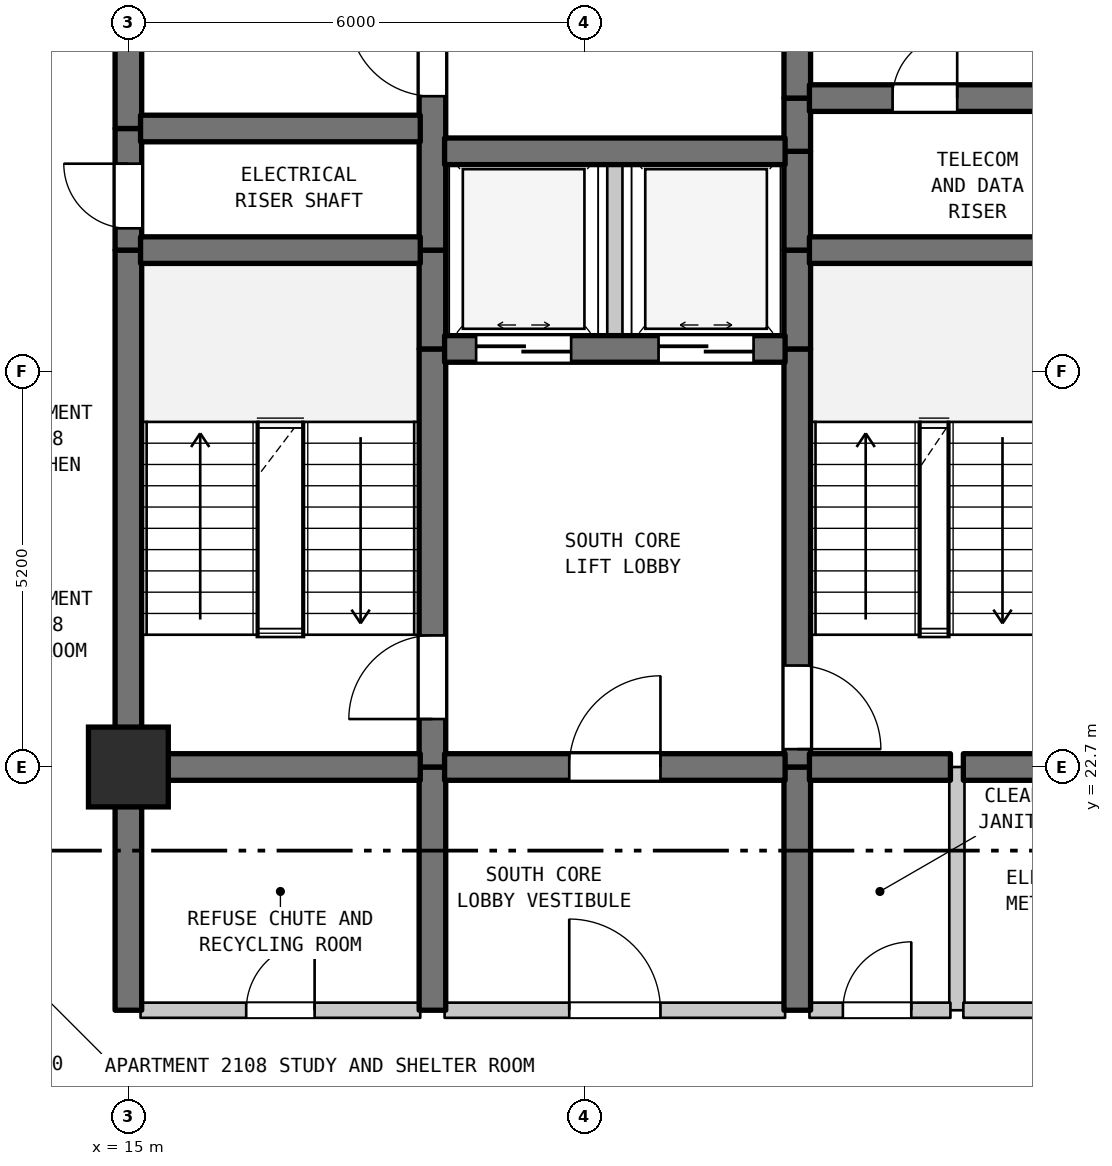
"""IFC4 building model, lengths in metres.
Left out: names, types, materials, properties, quantities, classifications, styles, units other than length and angle.
Written with IfcOpenShell. Run it as: python <this file> out.ifc"""

import sys

from ifc_helpers import new_model, si_unit, direction, frame, frame_2d, origin, origin_2d, place, context, subcontext, project, spatial, rectangle, extrude, element, fill, save


model = new_model("IFC4")
c1 = context("Model", 3, precision=1e-05, world=origin(), true_north=direction((0.0, 1.0)))
c2 = subcontext(c1, "Body", "Model", "MODEL_VIEW")
j1 = project(units=[si_unit("LENGTHUNIT", "METRE"), si_unit("PLANEANGLEUNIT", "RADIAN")], contexts=[c1])
p1 = place(None, origin())
s1 = spatial("IfcSite", under=j1, at=p1, CompositionType="ELEMENT")
p2 = place(p1, origin())
s2 = spatial("IfcBuilding", under=s1, at=p2, CompositionType="ELEMENT")
p3 = place(p2, frame((0.0, 0.0, 90.9)))
s3 = spatial("IfcBuildingStorey", under=s2, at=p3, CompositionType="ELEMENT", Elevation=90.9)
p4 = place(p3, frame((15.0, 22.7, 0.0), z_axis=(0.0, 0.0, 1.0), x_axis=(1.0, 0.0, 0.0)))
e1 = element("IfcColumn", 1, at=p4, inside=s3, PredefinedType="COLUMN", context=c2, shape_type="SweptSolid", body=[
    extrude(rectangle(XDim=1.05, YDim=1.05, at=origin_2d()), origin(), (0.0, 0.0, 1.0), 3.7),
])
p5 = place(p3, frame((15.0, 19.5, 0.0), z_axis=(0.0, 0.0, 1.0), x_axis=(0.0, 1.0, 0.0)))
e2 = element("IfcWall", 2, at=p5, inside=s3, PredefinedType="SHEAR", context=c2, shape_type="SweptSolid", body=[
    extrude(rectangle(XDim=3.2, YDim=0.35, at=frame_2d((1.6, 0.0))), origin(), (0.0, 0.0, 1.0), 3.385),
])
p6 = place(p3, frame((15.0, 22.7, 0.0), z_axis=(0.0, 0.0, 1.0), x_axis=(0.0, 1.0, 0.0)))
e3 = element("IfcWall", 3, at=p6, inside=s3, PredefinedType="SHEAR", context=c2, shape_type="SweptSolid", body=[
    extrude(rectangle(XDim=6.8, YDim=0.35, at=frame_2d((3.4, 0.0))), origin(), (0.0, 0.0, 1.0), 3.385),
])
p7 = place(p3, frame((15.0, 29.5, 0.0), z_axis=(0.0, 0.0, 1.0), x_axis=(0.0, 1.0, 0.0)))
e4 = element("IfcWall", 4, at=p7, inside=s3, PredefinedType="SHEAR", context=c2, shape_type="SweptSolid", body=[
    extrude(rectangle(XDim=1.6, YDim=0.35, at=frame_2d((0.8, 0.0))), origin(), (0.0, 0.0, 1.0), 3.385),
])
p8 = place(p7, frame((0.287, 0.0, 0.0)))
e5 = element("IfcOpeningElement", 5, at=p8, cuts=e4, PredefinedType="OPENING", context=c2, shape_type="SweptSolid", body=[
    extrude(rectangle(XDim=0.85, YDim=2.1, at=frame_2d((0.425, 1.05))), frame((0.0, 0.185, 0.0), z_axis=(0.0, -1.0, 0.0), x_axis=(1.0, 0.0, 0.0)), (0.0, 0.0, 1.0), 0.37),
])
p9 = place(p3, frame((15.0, 31.1, 0.0), z_axis=(0.0, 0.0, 1.0), x_axis=(0.0, 1.0, 0.0)))
e6 = element("IfcWall", 6, at=p9, inside=s3, PredefinedType="SHEAR", context=c2, shape_type="SweptSolid", body=[
    extrude(rectangle(XDim=6.8, YDim=0.35, at=frame_2d((3.4, 0.0))), origin(), (0.0, 0.0, 1.0), 3.385),
])
p10 = place(p3, frame((19.0, 19.5, 0.0), z_axis=(0.0, 0.0, 1.0), x_axis=(0.0, 1.0, 0.0)))
e7 = element("IfcWall", 7, at=p10, inside=s3, PredefinedType="SHEAR", context=c2, shape_type="SweptSolid", body=[
    extrude(rectangle(XDim=3.2, YDim=0.35, at=frame_2d((1.6, 0.0))), origin(), (0.0, 0.0, 1.0), 3.385),
])
p11 = place(p3, frame((19.0, 22.7, 0.0), z_axis=(0.0, 0.0, 1.0), x_axis=(0.0, 1.0, 0.0)))
e8 = element("IfcWall", 8, at=p11, inside=s3, PredefinedType="SHEAR", context=c2, shape_type="SweptSolid", body=[
    extrude(rectangle(XDim=5.5, YDim=0.35, at=frame_2d((2.75, 0.0))), origin(), (0.0, 0.0, 1.0), 3.385),
])
p12 = place(p11, frame((0.631, 0.0, 0.0)))
e9 = element("IfcOpeningElement", 9, at=p12, cuts=e8, PredefinedType="OPENING", context=c2, shape_type="SweptSolid", body=[
    extrude(rectangle(XDim=1.1, YDim=2.15, at=frame_2d((0.55, 1.075))), frame((0.0, 0.185, 0.0), z_axis=(0.0, -1.0, 0.0), x_axis=(1.0, 0.0, 0.0)), (0.0, 0.0, 1.0), 0.37),
])
p13 = place(p3, frame((19.0, 28.2, 0.0), z_axis=(0.0, 0.0, 1.0), x_axis=(0.0, 1.0, 0.0)))
e10 = element("IfcWall", 10, at=p13, inside=s3, PredefinedType="SHEAR", context=c2, shape_type="SweptSolid", body=[
    extrude(rectangle(XDim=1.3, YDim=0.35, at=frame_2d((0.65, 0.0))), origin(), (0.0, 0.0, 1.0), 3.385),
])
p14 = place(p3, frame((19.0, 29.5, 0.0), z_axis=(0.0, 0.0, 1.0), x_axis=(0.0, 1.0, 0.0)))
e11 = element("IfcWall", 11, at=p14, inside=s3, PredefinedType="SHEAR", context=c2, shape_type="SweptSolid", body=[
    extrude(rectangle(XDim=5.5, YDim=0.35, at=frame_2d((2.75, 0.0))), origin(), (0.0, 0.0, 1.0), 3.385),
])
p15 = place(p14, frame((2.025, 0.0, 0.0)))
e12 = element("IfcOpeningElement", 12, at=p15, cuts=e11, PredefinedType="OPENING", context=c2, shape_type="SweptSolid", body=[
    extrude(rectangle(XDim=1.1, YDim=2.15, at=frame_2d((0.55, 1.075))), frame((0.0, 0.185, 0.0), z_axis=(0.0, -1.0, 0.0), x_axis=(1.0, 0.0, 0.0)), (0.0, 0.0, 1.0), 0.37),
])
p16 = place(p3, frame((21.4, 28.2, 0.0), z_axis=(0.0, 0.0, 1.0), x_axis=(0.0, 1.0, 0.0)))
e13 = element("IfcWall", 13, at=p16, inside=s3, PredefinedType="STANDARD", context=c2, shape_type="SweptSolid", body=[
    extrude(rectangle(XDim=2.6, YDim=0.2, at=frame_2d((1.3, 0.0))), origin(), (0.0, 0.0, 1.0), 3.385),
])
p17 = place(p3, frame((23.8, 19.5, 0.0), z_axis=(0.0, 0.0, 1.0), x_axis=(0.0, 1.0, 0.0)))
e14 = element("IfcWall", 14, at=p17, inside=s3, PredefinedType="SHEAR", context=c2, shape_type="SweptSolid", body=[
    extrude(rectangle(XDim=3.2, YDim=0.35, at=frame_2d((1.6, 0.0))), origin(), (0.0, 0.0, 1.0), 3.385),
])
p18 = place(p3, frame((23.8, 22.7, 0.0), z_axis=(0.0, 0.0, 1.0), x_axis=(0.0, 1.0, 0.0)))
e15 = element("IfcWall", 15, at=p18, inside=s3, PredefinedType="SHEAR", context=c2, shape_type="SweptSolid", body=[
    extrude(rectangle(XDim=5.5, YDim=0.35, at=frame_2d((2.75, 0.0))), origin(), (0.0, 0.0, 1.0), 3.385),
])
p19 = place(p18, frame((0.235, 0.0, 0.0)))
e16 = element("IfcOpeningElement", 16, at=p19, cuts=e15, PredefinedType="OPENING", context=c2, shape_type="SweptSolid", body=[
    extrude(rectangle(XDim=1.1, YDim=2.15, at=frame_2d((0.55, 1.075))), frame((0.0, 0.185, 0.0), z_axis=(0.0, -1.0, 0.0), x_axis=(1.0, 0.0, 0.0)), (0.0, 0.0, 1.0), 0.37),
])
for number, where, z_axis, x_axis in (
    (17, (23.8, 28.2, 0.0), (0.0, 0.0, 1.0), (0.0, 1.0, 0.0)),
    (18, (23.8, 29.5, 0.0), (0.0, 0.0, 1.0), (0.0, 1.0, 0.0)),
):
    element("IfcWall", number, at=place(p3, frame(where, z_axis=z_axis, x_axis=x_axis)), inside=s3, PredefinedType="SHEAR", context=c2, shape_type="SweptSolid", body=[
        extrude(rectangle(XDim=1.3, YDim=0.35, at=frame_2d((0.65, 0.0))), origin(), (0.0, 0.0, 1.0), 3.385),
    ])
p20 = place(p3, frame((23.8, 30.8, 0.0), z_axis=(0.0, 0.0, 1.0), x_axis=(0.0, 1.0, 0.0)))
e19 = element("IfcWall", 19, at=p20, inside=s3, PredefinedType="SHEAR", context=c2, shape_type="SweptSolid", body=[
    extrude(rectangle(XDim=0.7, YDim=0.35, at=frame_2d((0.35, 0.0))), origin(), (0.0, 0.0, 1.0), 3.385),
])
p21 = place(p3, frame((23.8, 31.5, 0.0), z_axis=(0.0, 0.0, 1.0), x_axis=(0.0, 1.0, 0.0)))
e20 = element("IfcWall", 20, at=p21, inside=s3, PredefinedType="SHEAR", context=c2, shape_type="SweptSolid", body=[
    extrude(rectangle(XDim=3.5, YDim=0.35, at=frame_2d((1.75, 0.0))), origin(), (0.0, 0.0, 1.0), 3.385),
])
p22 = place(p21, frame((1.127, 0.0, 0.0)))
e21 = element("IfcOpeningElement", 21, at=p22, cuts=e20, PredefinedType="OPENING", context=c2, shape_type="SweptSolid", body=[
    extrude(rectangle(XDim=1.1, YDim=2.15, at=frame_2d((0.55, 1.075))), frame((0.0, 0.185, 0.0), z_axis=(0.0, -1.0, 0.0), x_axis=(1.0, 0.0, 0.0)), (0.0, 0.0, 1.0), 0.37),
])
p23 = place(p3, frame((25.9, 19.5, 0.0), z_axis=(0.0, 0.0, 1.0), x_axis=(0.0, 1.0, 0.0)))
e22 = element("IfcWall", 22, at=p23, inside=s3, PredefinedType="STANDARD", context=c2, shape_type="SweptSolid", body=[
    extrude(rectangle(XDim=3.2, YDim=0.2, at=frame_2d((1.6, 0.0))), origin(), (0.0, 0.0, 1.0), 3.385),
])
p24 = place(p3, frame((15.16, 19.5, 0.0), z_axis=(0.0, 0.0, 1.0), x_axis=(1.0, 0.0, 0.0)))
e23 = element("IfcWall", 23, at=p24, inside=s3, PredefinedType="STANDARD", context=c2, shape_type="SweptSolid", body=[
    extrude(rectangle(XDim=3.68, YDim=0.2, at=frame_2d((1.84, 0.0))), origin(), (0.0, 0.0, 1.0), 3.385),
])
p25 = place(p24, frame((1.39, 0.0, 0.0)))
e24 = element("IfcOpeningElement", 24, at=p25, cuts=e23, PredefinedType="OPENING", context=c2, shape_type="SweptSolid", body=[
    extrude(rectangle(XDim=0.9, YDim=2.15, at=frame_2d((0.45, 1.075))), frame((0.0, 0.11, 0.0), z_axis=(0.0, -1.0, 0.0), x_axis=(1.0, 0.0, 0.0)), (0.0, 0.0, 1.0), 0.22),
])
p26 = place(p3, frame((19.16, 19.5, 0.0), z_axis=(0.0, 0.0, 1.0), x_axis=(1.0, 0.0, 0.0)))
e25 = element("IfcWall", 25, at=p26, inside=s3, PredefinedType="STANDARD", context=c2, shape_type="SweptSolid", body=[
    extrude(rectangle(XDim=4.48, YDim=0.2, at=frame_2d((2.24, 0.0))), origin(), (0.0, 0.0, 1.0), 3.385),
])
p27 = place(p26, frame((1.64, 0.0, 0.0)))
e26 = element("IfcOpeningElement", 26, at=p27, cuts=e25, PredefinedType="OPENING", context=c2, shape_type="SweptSolid", body=[
    extrude(rectangle(XDim=1.2, YDim=2.2, at=frame_2d((0.6, 1.1))), frame((0.0, 0.11, 0.0), z_axis=(0.0, -1.0, 0.0), x_axis=(1.0, 0.0, 0.0)), (0.0, 0.0, 1.0), 0.22),
])
p28 = place(p3, frame((23.96, 19.5, 0.0), z_axis=(0.0, 0.0, 1.0), x_axis=(1.0, 0.0, 0.0)))
e27 = element("IfcWall", 27, at=p28, inside=s3, PredefinedType="STANDARD", context=c2, shape_type="SweptSolid", body=[
    extrude(rectangle(XDim=1.855, YDim=0.2, at=frame_2d((0.927, 0.0))), origin(), (0.0, 0.0, 1.0), 3.385),
])
p29 = place(p28, frame((0.44, 0.0, 0.0)))
e28 = element("IfcOpeningElement", 28, at=p29, cuts=e27, PredefinedType="OPENING", context=c2, shape_type="SweptSolid", body=[
    extrude(rectangle(XDim=0.9, YDim=2.15, at=frame_2d((0.45, 1.075))), frame((0.0, 0.11, 0.0), z_axis=(0.0, -1.0, 0.0), x_axis=(1.0, 0.0, 0.0)), (0.0, 0.0, 1.0), 0.22),
])
p30 = place(p3, frame((25.985, 19.5, 0.0), z_axis=(0.0, 0.0, 1.0), x_axis=(1.0, 0.0, 0.0)))
e29 = element("IfcWall", 29, at=p30, inside=s3, PredefinedType="STANDARD", context=c2, shape_type="SweptSolid", body=[
    extrude(rectangle(XDim=4.655, YDim=0.2, at=frame_2d((2.327, 0.0))), origin(), (0.0, 0.0, 1.0), 3.385),
])
p31 = place(p30, frame((1.845, 0.0, 0.0)))
e30 = element("IfcOpeningElement", 30, at=p31, cuts=e29, PredefinedType="OPENING", context=c2, shape_type="SweptSolid", body=[
    extrude(rectangle(XDim=0.9, YDim=2.15, at=frame_2d((0.45, 1.075))), frame((0.0, 0.11, 0.0), z_axis=(0.0, -1.0, 0.0), x_axis=(1.0, 0.0, 0.0)), (0.0, 0.0, 1.0), 0.22),
])
p32 = place(p3, frame((15.16, 22.7, 0.0), z_axis=(0.0, 0.0, 1.0), x_axis=(1.0, 0.0, 0.0)))
e31 = element("IfcWall", 31, at=p32, inside=s3, PredefinedType="SHEAR", context=c2, shape_type="SweptSolid", body=[
    extrude(rectangle(XDim=3.68, YDim=0.35, at=frame_2d((1.84, 0.0))), origin(), (0.0, 0.0, 1.0), 3.385),
])
p33 = place(p3, frame((19.16, 22.7, 0.0), z_axis=(0.0, 0.0, 1.0), x_axis=(1.0, 0.0, 0.0)))
e32 = element("IfcWall", 32, at=p33, inside=s3, PredefinedType="SHEAR", context=c2, shape_type="SweptSolid", body=[
    extrude(rectangle(XDim=4.48, YDim=0.35, at=frame_2d((2.24, 0.0))), origin(), (0.0, 0.0, 1.0), 3.385),
])
p34 = place(p33, frame((1.64, 0.0, 0.0)))
e33 = element("IfcOpeningElement", 33, at=p34, cuts=e32, PredefinedType="OPENING", context=c2, shape_type="SweptSolid", body=[
    extrude(rectangle(XDim=1.2, YDim=2.2, at=frame_2d((0.6, 1.1))), frame((0.0, 0.185, 0.0), z_axis=(0.0, -1.0, 0.0), x_axis=(1.0, 0.0, 0.0)), (0.0, 0.0, 1.0), 0.37),
])
p35 = place(p3, frame((23.96, 22.7, 0.0), z_axis=(0.0, 0.0, 1.0), x_axis=(1.0, 0.0, 0.0)))
e34 = element("IfcWall", 34, at=p35, inside=s3, PredefinedType="SHEAR", context=c2, shape_type="SweptSolid", body=[
    extrude(rectangle(XDim=1.855, YDim=0.35, at=frame_2d((0.927, 0.0))), origin(), (0.0, 0.0, 1.0), 3.385),
])
p36 = place(p3, frame((25.985, 22.7, 0.0), z_axis=(0.0, 0.0, 1.0), x_axis=(1.0, 0.0, 0.0)))
e35 = element("IfcWall", 35, at=p36, inside=s3, PredefinedType="SHEAR", context=c2, shape_type="SweptSolid", body=[
    extrude(rectangle(XDim=1.155, YDim=0.35, at=frame_2d((0.577, 0.0))), origin(), (0.0, 0.0, 1.0), 3.385),
])
p37 = place(p3, frame((19.16, 28.2, 0.0), z_axis=(0.0, 0.0, 1.0), x_axis=(1.0, 0.0, 0.0)))
e36 = element("IfcWall", 36, at=p37, inside=s3, PredefinedType="SHEAR", context=c2, shape_type="SweptSolid", body=[
    extrude(rectangle(XDim=4.48, YDim=0.35, at=frame_2d((2.24, 0.0))), origin(), (0.0, 0.0, 1.0), 3.385),
])
p38 = place(p37, frame((0.415, 0.0, 0.0)))
e37 = element("IfcOpeningElement", 37, at=p38, cuts=e36, PredefinedType="OPENING", context=c2, shape_type="SweptSolid", body=[
    extrude(rectangle(XDim=1.25, YDim=2.2, at=frame_2d((0.625, 1.1))), frame((0.0, 0.185, 0.0), z_axis=(0.0, -1.0, 0.0), x_axis=(1.0, 0.0, 0.0)), (0.0, 0.0, 1.0), 0.37),
])
p39 = place(p37, frame((2.815, 0.0, 0.0)))
e38 = element("IfcOpeningElement", 38, at=p39, cuts=e36, PredefinedType="OPENING", context=c2, shape_type="SweptSolid", body=[
    extrude(rectangle(XDim=1.25, YDim=2.2, at=frame_2d((0.625, 1.1))), frame((0.0, 0.185, 0.0), z_axis=(0.0, -1.0, 0.0), x_axis=(1.0, 0.0, 0.0)), (0.0, 0.0, 1.0), 0.37),
])
p40 = place(p3, frame((15.16, 29.5, 0.0), z_axis=(0.0, 0.0, 1.0), x_axis=(1.0, 0.0, 0.0)))
e39 = element("IfcWall", 39, at=p40, inside=s3, PredefinedType="SHEAR", context=c2, shape_type="SweptSolid", body=[
    extrude(rectangle(XDim=3.68, YDim=0.35, at=frame_2d((1.84, 0.0))), origin(), (0.0, 0.0, 1.0), 3.385),
])
p41 = place(p3, frame((23.96, 29.5, 0.0), z_axis=(0.0, 0.0, 1.0), x_axis=(1.0, 0.0, 0.0)))
e40 = element("IfcWall", 40, at=p41, inside=s3, PredefinedType="SHEAR", context=c2, shape_type="SweptSolid", body=[
    extrude(rectangle(XDim=3.18, YDim=0.35, at=frame_2d((1.59, 0.0))), origin(), (0.0, 0.0, 1.0), 3.385),
])
p42 = place(p3, frame((19.16, 30.8, 0.0), z_axis=(0.0, 0.0, 1.0), x_axis=(1.0, 0.0, 0.0)))
e41 = element("IfcWall", 41, at=p42, inside=s3, PredefinedType="SHEAR", context=c2, shape_type="SweptSolid", body=[
    extrude(rectangle(XDim=4.48, YDim=0.35, at=frame_2d((2.24, 0.0))), origin(), (0.0, 0.0, 1.0), 3.385),
])
p43 = place(p3, frame((15.16, 31.1, 0.0), z_axis=(0.0, 0.0, 1.0), x_axis=(1.0, 0.0, 0.0)))
e42 = element("IfcWall", 42, at=p43, inside=s3, PredefinedType="SHEAR", context=c2, shape_type="SweptSolid", body=[
    extrude(rectangle(XDim=3.68, YDim=0.35, at=frame_2d((1.84, 0.0))), origin(), (0.0, 0.0, 1.0), 3.385),
])
p44 = place(p3, frame((23.96, 31.5, 0.0), z_axis=(0.0, 0.0, 1.0), x_axis=(1.0, 0.0, 0.0)))
e43 = element("IfcWall", 43, at=p44, inside=s3, PredefinedType="SHEAR", context=c2, shape_type="SweptSolid", body=[
    extrude(rectangle(XDim=3.18, YDim=0.35, at=frame_2d((1.59, 0.0))), origin(), (0.0, 0.0, 1.0), 3.385),
])
p45 = place(p44, frame((1.094, 0.0, 0.0)))
e44 = element("IfcOpeningElement", 44, at=p45, cuts=e43, PredefinedType="OPENING", context=c2, shape_type="SweptSolid", body=[
    extrude(rectangle(XDim=0.85, YDim=2.1, at=frame_2d((0.425, 1.05))), frame((0.0, 0.185, 0.0), z_axis=(0.0, -1.0, 0.0), x_axis=(1.0, 0.0, 0.0)), (0.0, 0.0, 1.0), 0.37),
])
p46 = place(p8, origin())
e45 = element("IfcDoor", 45, at=p46, inside=s3, OperationType="SINGLE_SWING_RIGHT", PredefinedType="DOOR", context=c2, shape_type="SweptSolid", body=[
    extrude(rectangle(XDim=0.85, YDim=2.1, at=frame_2d((0.425, 1.05))), frame((0.0, 0.025, 0.0), z_axis=(0.0, -1.0, 0.0), x_axis=(1.0, 0.0, 0.0)), (0.0, 0.0, 1.0), 0.05),
])
fill(e5, e45)
p47 = place(p12, origin())
e46 = element("IfcDoor", 46, at=p47, inside=s3, OperationType="SINGLE_SWING_LEFT", PredefinedType="DOOR", context=c2, shape_type="SweptSolid", body=[
    extrude(rectangle(XDim=1.1, YDim=2.15, at=frame_2d((0.55, 1.075))), frame((0.0, 0.025, 0.0), z_axis=(0.0, -1.0, 0.0), x_axis=(1.0, 0.0, 0.0)), (0.0, 0.0, 1.0), 0.05),
])
fill(e9, e46)
p48 = place(p15, origin())
e47 = element("IfcDoor", 47, at=p48, inside=s3, OperationType="SINGLE_SWING_RIGHT", PredefinedType="DOOR", context=c2, shape_type="SweptSolid", body=[
    extrude(rectangle(XDim=1.1, YDim=2.15, at=frame_2d((0.55, 1.075))), frame((0.0, 0.025, 0.0), z_axis=(0.0, -1.0, 0.0), x_axis=(1.0, 0.0, 0.0)), (0.0, 0.0, 1.0), 0.05),
])
fill(e12, e47)
p49 = place(p19, frame((1.1, 0.0, 0.0), z_axis=(0.0, 0.0, 1.0), x_axis=(-1.0, 0.0, 0.0)))
e48 = element("IfcDoor", 48, at=p49, inside=s3, OperationType="SINGLE_SWING_LEFT", PredefinedType="DOOR", context=c2, shape_type="SweptSolid", body=[
    extrude(rectangle(XDim=1.1, YDim=2.15, at=frame_2d((0.55, 1.075))), frame((0.0, 0.025, 0.0), z_axis=(0.0, -1.0, 0.0), x_axis=(1.0, 0.0, 0.0)), (0.0, 0.0, 1.0), 0.05),
])
fill(e16, e48)
p50 = place(p25, origin())
e49 = element("IfcDoor", 49, at=p50, inside=s3, OperationType="SINGLE_SWING_RIGHT", PredefinedType="DOOR", context=c2, shape_type="SweptSolid", body=[
    extrude(rectangle(XDim=0.9, YDim=2.15, at=frame_2d((0.45, 1.075))), frame((0.0, 0.025, 0.0), z_axis=(0.0, -1.0, 0.0), x_axis=(1.0, 0.0, 0.0)), (0.0, 0.0, 1.0), 0.05),
])
fill(e24, e49)
p51 = place(p27, origin())
e50 = element("IfcDoor", 50, at=p51, inside=s3, OperationType="SINGLE_SWING_LEFT", PredefinedType="DOOR", context=c2, shape_type="SweptSolid", body=[
    extrude(rectangle(XDim=1.2, YDim=2.2, at=frame_2d((0.6, 1.1))), frame((0.0, 0.025, 0.0), z_axis=(0.0, -1.0, 0.0), x_axis=(1.0, 0.0, 0.0)), (0.0, 0.0, 1.0), 0.05),
])
fill(e26, e50)
p52 = place(p29, origin())
e51 = element("IfcDoor", 51, at=p52, inside=s3, OperationType="SINGLE_SWING_RIGHT", PredefinedType="DOOR", context=c2, shape_type="SweptSolid", body=[
    extrude(rectangle(XDim=0.9, YDim=2.15, at=frame_2d((0.45, 1.075))), frame((0.0, 0.025, 0.0), z_axis=(0.0, -1.0, 0.0), x_axis=(1.0, 0.0, 0.0)), (0.0, 0.0, 1.0), 0.05),
])
fill(e28, e51)
p53 = place(p34, origin())
e52 = element("IfcDoor", 52, at=p53, inside=s3, OperationType="SINGLE_SWING_RIGHT", PredefinedType="DOOR", context=c2, shape_type="SweptSolid", body=[
    extrude(rectangle(XDim=1.2, YDim=2.2, at=frame_2d((0.6, 1.1))), frame((0.0, 0.025, 0.0), z_axis=(0.0, -1.0, 0.0), x_axis=(1.0, 0.0, 0.0)), (0.0, 0.0, 1.0), 0.05),
])
fill(e33, e52)
p54 = place(p38, origin())
e53 = element("IfcDoor", 53, at=p54, inside=s3, OperationType="DOUBLE_DOOR_SLIDING", PredefinedType="DOOR", context=c2, shape_type="SweptSolid", body=[
    extrude(rectangle(XDim=1.25, YDim=2.2, at=frame_2d((0.625, 1.1))), frame((0.0, 0.025, 0.0), z_axis=(0.0, -1.0, 0.0), x_axis=(1.0, 0.0, 0.0)), (0.0, 0.0, 1.0), 0.05),
])
fill(e37, e53)
p55 = place(p39, origin())
e54 = element("IfcDoor", 54, at=p55, inside=s3, OperationType="DOUBLE_DOOR_SLIDING", PredefinedType="DOOR", context=c2, shape_type="SweptSolid", body=[
    extrude(rectangle(XDim=1.25, YDim=2.2, at=frame_2d((0.625, 1.1))), frame((0.0, 0.025, 0.0), z_axis=(0.0, -1.0, 0.0), x_axis=(1.0, 0.0, 0.0)), (0.0, 0.0, 1.0), 0.05),
])
fill(e38, e54)
p56 = place(p45, origin())
e55 = element("IfcDoor", 55, at=p56, inside=s3, OperationType="SINGLE_SWING_RIGHT", PredefinedType="DOOR", context=c2, shape_type="SweptSolid", body=[
    extrude(rectangle(XDim=0.85, YDim=2.1, at=frame_2d((0.425, 1.05))), frame((0.0, 0.025, 0.0), z_axis=(0.0, -1.0, 0.0), x_axis=(1.0, 0.0, 0.0)), (0.0, 0.0, 1.0), 0.05),
])
fill(e44, e55)
save(model, sys.argv[1])
